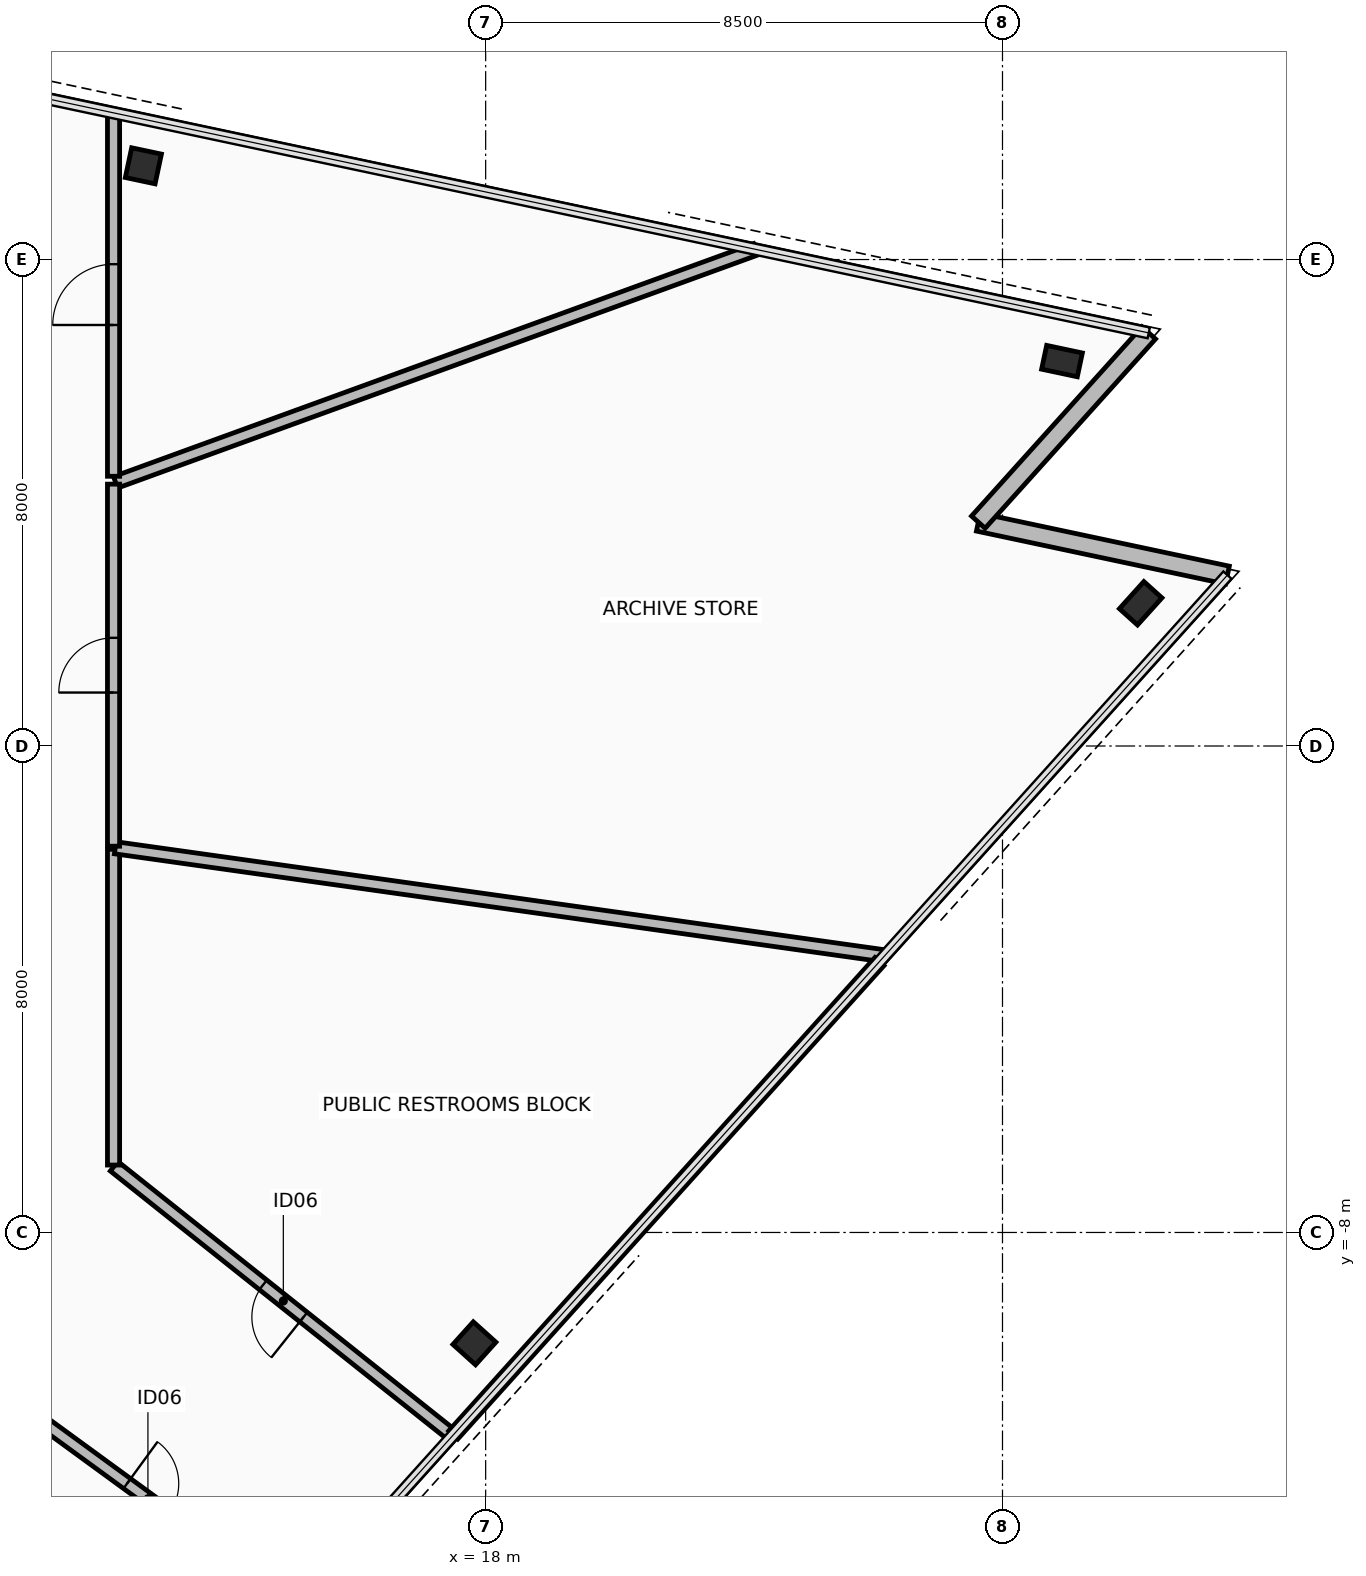
"""IFC4 building model, lengths in metres.
Left out: names, types, materials, properties, quantities, classifications, styles, units other than length and angle.
Written with IfcOpenShell. Run it as: python <this file> out.ifc"""

import sys

from ifc_helpers import new_model, si_unit, direction, frame, frame_2d, origin, origin_2d, place, context, subcontext, project, spatial, rectangle, hollow_rectangle, extrude, element, fill, save


model = new_model("IFC4")
c1 = context("Model", 3, precision=1e-05, world=origin(), true_north=direction((0.0, 1.0)))
c2 = subcontext(c1, "Body", "Model", "MODEL_VIEW")
j1 = project(units=[si_unit("LENGTHUNIT", "METRE"), si_unit("PLANEANGLEUNIT", "RADIAN")], contexts=[c1])
p1 = place(None, origin())
s1 = spatial("IfcSite", under=j1, at=p1, CompositionType="ELEMENT")
p2 = place(p1, origin())
s2 = spatial("IfcBuilding", under=s1, at=p2, CompositionType="ELEMENT")
p3 = place(p2, frame((0.0, 0.0, 214.85)))
s3 = spatial("IfcBuildingStorey", under=s2, at=p3, CompositionType="ELEMENT", Elevation=214.85)
p4 = place(p3, frame((17.815, -9.823, 0.0), z_axis=(0.0, 0.0, 1.0), x_axis=(0.669130606359, 0.743144825477, 0.0)))
e1 = element("IfcColumn", 1, at=p4, inside=s3, PredefinedType="COLUMN", context=c2, shape_type="SweptSolid", body=[
    extrude(hollow_rectangle(XDim=0.5, YDim=0.5, WallThickness=0.032, at=origin_2d()), origin(), (0.0, 0.0, 1.0), 3.6),
])
for number, where, z_axis, x_axis in (
    (2, (28.773, 2.347, 0.0), (0.0, 0.0, 1.0), (0.669, 0.743, 0.0)),
    (3, (27.479, 6.33, 0.0), (0.0, 0.0, 1.0), (-0.978, 0.208, 0.0)),
):
    element("IfcColumn", number, at=place(p3, frame(where, z_axis=z_axis, x_axis=x_axis)), inside=s3, PredefinedType="COLUMN", context=c2, shape_type="SweptSolid", body=[
        extrude(hollow_rectangle(XDim=0.4, YDim=0.6, WallThickness=0.03, at=origin_2d()), origin(), (0.0, 0.0, 1.0), 3.6),
    ])
p5 = place(p3, frame((12.371, 9.542, 0.0), z_axis=(0.0, 0.0, 1.0), x_axis=(-0.978147600734, 0.207911690818, 0.0)))
e4 = element("IfcColumn", 4, at=p5, inside=s3, PredefinedType="COLUMN", context=c2, shape_type="SweptSolid", body=[
    extrude(hollow_rectangle(XDim=0.5, YDim=0.5, WallThickness=0.032, at=origin_2d()), origin(), (0.0, 0.0, 1.0), 3.6),
])
for number, where, z_axis, x_axis in (
    (5, (30.199, 2.811, 0.0), (0.0, 0.0, 1.0), (-0.978, 0.208, 0.0)),
    (6, (26.103, 3.681, 0.0), (0.0, 0.0, 1.0), (0.669, 0.743, 0.0)),
):
    element("IfcWall", number, at=place(p3, frame(where, z_axis=z_axis, x_axis=x_axis)), inside=s3, PredefinedType="STANDARD", context=c2, shape_type="SweptSolid", body=[
        extrude(rectangle(XDim=4.188, YDim=0.3, at=frame_2d((2.094, 0.0))), origin(), (0.0, 0.0, 1.0), 2.715),
    ])
p6 = place(p3, frame((9.985, -10.585, 0.0), z_axis=(0.0, 0.0, 1.0), x_axis=(0.807842527243, -0.589398380705, 0.0)))
e7 = element("IfcWall", 7, at=p6, inside=s3, PredefinedType="PARTITIONING", context=c2, shape_type="SweptSolid", body=[
    extrude(rectangle(XDim=6.091, YDim=0.2, at=frame_2d((3.045, 0.0))), origin(), (0.0, 0.0, 1.0), 2.715),
])
p7 = place(p6, frame((2.621, 0.0, 0.0)))
e8 = element("IfcOpeningElement", 8, at=p7, cuts=e7, PredefinedType="OPENING", context=c2, shape_type="SweptSolid", body=[
    extrude(rectangle(XDim=0.85, YDim=2.1, at=frame_2d((0.425, 1.05))), frame((0.0, 0.11, 0.0), z_axis=(0.0, -1.0, 0.0), x_axis=(1.0, 0.0, 0.0)), (0.0, 0.0, 1.0), 0.22),
])
p8 = place(p3, frame((17.456, -11.342, 0.0), z_axis=(0.0, 0.0, 1.0), x_axis=(-0.782369623791, 0.622814395923, 0.0)))
e9 = element("IfcWall", 9, at=p8, inside=s3, PredefinedType="PARTITIONING", context=c2, shape_type="SweptSolid", body=[
    extrude(rectangle(XDim=7.115, YDim=0.2, at=frame_2d((3.558, 0.0))), origin(), (0.0, 0.0, 1.0), 2.715),
])
p9 = place(p8, frame((3.133, 0.0, 0.0)))
e10 = element("IfcOpeningElement", 10, at=p9, cuts=e9, PredefinedType="OPENING", context=c2, shape_type="SweptSolid", body=[
    extrude(rectangle(XDim=0.85, YDim=2.1, at=frame_2d((0.425, 1.05))), frame((0.0, 0.11, 0.0), z_axis=(0.0, -1.0, 0.0), x_axis=(1.0, 0.0, 0.0)), (0.0, 0.0, 1.0), 0.22),
])
p10 = place(p3, frame((11.88, -6.891, 0.0), z_axis=(0.0, 0.0, 1.0), x_axis=(0.0, 1.0, 0.0)))
e11 = element("IfcWall", 11, at=p10, inside=s3, PredefinedType="PARTITIONING", context=c2, shape_type="SweptSolid", body=[
    extrude(rectangle(XDim=5.193, YDim=0.2, at=frame_2d((2.596, 0.0))), origin(), (0.0, 0.0, 1.0), 3.42),
])
p11 = place(p3, frame((11.908, -1.674, 0.0), z_axis=(0.0, 0.0, 1.0), x_axis=(0.990269091079, -0.139165826457, 0.0)))
e12 = element("IfcWall", 12, at=p11, inside=s3, PredefinedType="PARTITIONING", context=c2, shape_type="SweptSolid", body=[
    extrude(rectangle(XDim=12.777, YDim=0.2, at=frame_2d((6.388, 0.0))), origin(), (0.0, 0.0, 1.0), 2.715),
])
p12 = place(p3, frame((24.476, -3.546, 0.0), z_axis=(0.0, 0.0, 1.0), x_axis=(-0.669132139193, -0.743143445305, 0.0)))
e13 = element("IfcWall", 13, at=p12, inside=s3, PredefinedType="PARTITIONING", context=c2, shape_type="SweptSolid", body=[
    extrude(rectangle(XDim=10.473, YDim=0.2, at=frame_2d((5.237, 0.0))), origin(), (0.0, 0.0, 1.0), 3.42),
])
p13 = place(p3, frame((22.44, 8.168, 0.0), z_axis=(0.0, 0.0, 1.0), x_axis=(-0.939690299273, -0.342026521564, 0.0)))
e14 = element("IfcWall", 14, at=p13, inside=s3, PredefinedType="PARTITIONING", context=c2, shape_type="SweptSolid", body=[
    extrude(rectangle(XDim=11.202, YDim=0.2, at=frame_2d((5.601, 0.0))), origin(), (0.0, 0.0, 1.0), 2.715),
])
p14 = place(p3, frame((11.88, 4.436, 0.0), z_axis=(0.0, 0.0, 1.0), x_axis=(0.0, 1.0, 0.0)))
e15 = element("IfcWall", 15, at=p14, inside=s3, PredefinedType="PARTITIONING", context=c2, shape_type="SweptSolid", body=[
    extrude(rectangle(XDim=5.977, YDim=0.2, at=frame_2d((2.988, 0.0))), origin(), (0.0, 0.0, 1.0), 2.715),
])
p15 = place(p14, frame((2.488, 0.0, 0.0)))
e16 = element("IfcOpeningElement", 16, at=p15, cuts=e15, PredefinedType="OPENING", context=c2, shape_type="SweptSolid", body=[
    extrude(rectangle(XDim=1.0, YDim=2.15, at=frame_2d((0.5, 1.075))), frame((0.0, 0.11, 0.0), z_axis=(0.0, -1.0, 0.0), x_axis=(1.0, 0.0, 0.0)), (0.0, 0.0, 1.0), 0.22),
])
p16 = place(p3, frame((11.88, -1.648, 0.0), z_axis=(0.0, 0.0, 1.0), x_axis=(0.0, 1.0, 0.0)))
e17 = element("IfcWall", 17, at=p16, inside=s3, PredefinedType="PARTITIONING", context=c2, shape_type="SweptSolid", body=[
    extrude(rectangle(XDim=5.954, YDim=0.2, at=frame_2d((2.977, 0.0))), origin(), (0.0, 0.0, 1.0), 3.42),
])
p17 = place(p16, frame((2.527, 0.0, 0.0)))
e18 = element("IfcOpeningElement", 18, at=p17, cuts=e17, PredefinedType="OPENING", context=c2, shape_type="SweptSolid", body=[
    extrude(rectangle(XDim=0.9, YDim=2.1, at=frame_2d((0.45, 1.05))), frame((0.0, 0.11, 0.0), z_axis=(0.0, -1.0, 0.0), x_axis=(1.0, 0.0, 0.0)), (0.0, 0.0, 1.0), 0.22),
])
p18 = place(p7, origin())
e19 = element("IfcDoor", 19, at=p18, inside=s3, OperationType="SINGLE_SWING_RIGHT", PredefinedType="DOOR", context=c2, shape_type="SweptSolid", body=[
    extrude(rectangle(XDim=0.85, YDim=2.1, at=frame_2d((0.425, 1.05))), frame((0.0, 0.025, 0.0), z_axis=(0.0, -1.0, 0.0), x_axis=(1.0, 0.0, 0.0)), (0.0, 0.0, 1.0), 0.05),
])
fill(e8, e19)
p19 = place(p9, origin())
e20 = element("IfcDoor", 20, at=p19, inside=s3, OperationType="SINGLE_SWING_RIGHT", PredefinedType="DOOR", context=c2, shape_type="SweptSolid", body=[
    extrude(rectangle(XDim=0.85, YDim=2.1, at=frame_2d((0.425, 1.05))), frame((0.0, 0.025, 0.0), z_axis=(0.0, -1.0, 0.0), x_axis=(1.0, 0.0, 0.0)), (0.0, 0.0, 1.0), 0.05),
])
fill(e10, e20)
p20 = place(p15, origin())
e21 = element("IfcDoor", 21, at=p20, inside=s3, OperationType="SINGLE_SWING_RIGHT", PredefinedType="DOOR", context=c2, shape_type="SweptSolid", body=[
    extrude(rectangle(XDim=1.0, YDim=2.15, at=frame_2d((0.5, 1.075))), frame((0.0, 0.025, 0.0), z_axis=(0.0, -1.0, 0.0), x_axis=(1.0, 0.0, 0.0)), (0.0, 0.0, 1.0), 0.05),
])
fill(e16, e21)
p21 = place(p17, origin())
e22 = element("IfcDoor", 22, at=p21, inside=s3, OperationType="SINGLE_SWING_LEFT", PredefinedType="DOOR", context=c2, shape_type="SweptSolid", body=[
    extrude(rectangle(XDim=0.9, YDim=2.1, at=frame_2d((0.45, 1.05))), frame((0.0, 0.025, 0.0), z_axis=(0.0, -1.0, 0.0), x_axis=(1.0, 0.0, 0.0)), (0.0, 0.0, 1.0), 0.05),
])
fill(e18, e22)
save(model, sys.argv[1])
